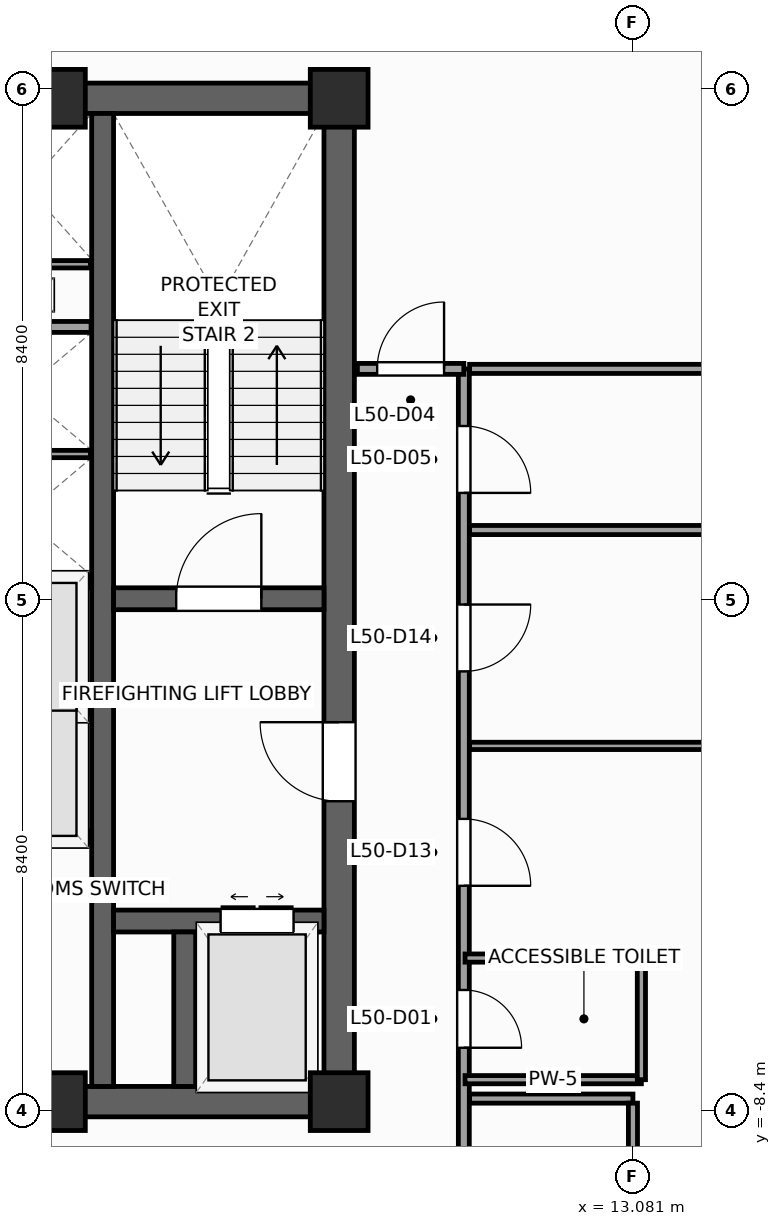
"""IFC4 building model, lengths in metres.
Left out: names, types, materials, properties, quantities, classifications, styles, units other than length and angle.
Written with IfcOpenShell. Run it as: python <this file> out.ifc"""

import sys

from ifc_helpers import new_model, si_unit, direction, frame, frame_2d, origin, origin_2d, place, context, subcontext, project, spatial, rectangle, extrude, source, transform, mapped, element, fill, save


model = new_model("IFC4")
c1 = context("Model", 3, precision=1e-05, world=origin(), true_north=direction((0.0, 1.0)))
c2 = subcontext(c1, "Body", "Model", "MODEL_VIEW")
j1 = project(units=[si_unit("LENGTHUNIT", "METRE"), si_unit("PLANEANGLEUNIT", "RADIAN")], contexts=[c1])
p1 = place(None, origin())
s1 = spatial("IfcSite", under=j1, at=p1, CompositionType="ELEMENT")
p2 = place(p1, origin())
s2 = spatial("IfcBuilding", under=s1, at=p2, CompositionType="ELEMENT")
p3 = place(p2, frame((0.0, 0.0, 209.5)))
s3 = spatial("IfcBuildingStorey", under=s2, at=p3, CompositionType="ELEMENT", Elevation=209.5)
p4 = place(p3, frame((-8.5, -8.25, 0.0), z_axis=(0.0, 0.0, 1.0), x_axis=(1.0, 0.0, 0.0)))
e1 = element("IfcWall", 1, at=p4, inside=s3, PredefinedType="SHEAR", context=c2, shape_type="SweptSolid", body=[
    extrude(rectangle(XDim=17.0, YDim=0.5, at=frame_2d((8.5, 0.0))), origin(), (0.0, 0.0, 1.0), 3.9),
])
p5 = place(p4, frame((7.85, 0.0, 0.0)))
e2 = element("IfcOpeningElement", 2, at=p5, cuts=e1, PredefinedType="OPENING", context=c2, shape_type="SweptSolid", body=[
    extrude(rectangle(XDim=1.3, YDim=2.2, at=frame_2d((0.65, 1.1))), frame((0.0, 0.26, 0.0), z_axis=(0.0, -1.0, 0.0), x_axis=(1.0, 0.0, 0.0)), (0.0, 0.0, 1.0), 0.52),
])
p6 = place(p3, frame((-8.5, 8.25, 0.0), z_axis=(0.0, 0.0, 1.0), x_axis=(1.0, 0.0, 0.0)))
e3 = element("IfcWall", 3, at=p6, inside=s3, PredefinedType="SHEAR", context=c2, shape_type="SweptSolid", body=[
    extrude(rectangle(XDim=17.0, YDim=0.5, at=frame_2d((8.5, 0.0))), origin(), (0.0, 0.0, 1.0), 3.9),
])
p7 = place(p3, frame((8.25, -8.0, 0.0), z_axis=(0.0, 0.0, 1.0), x_axis=(0.0, 1.0, 0.0)))
e4 = element("IfcWall", 4, at=p7, inside=s3, PredefinedType="SHEAR", context=c2, shape_type="SweptSolid", body=[
    extrude(rectangle(XDim=16.0, YDim=0.5, at=frame_2d((8.0, 0.0))), origin(), (0.0, 0.0, 1.0), 3.9),
])
p8 = place(p7, frame((4.69, 0.0, 0.0)))
e5 = element("IfcOpeningElement", 5, at=p8, cuts=e4, PredefinedType="OPENING", context=c2, shape_type="SweptSolid", body=[
    extrude(rectangle(XDim=1.3, YDim=2.2, at=frame_2d((0.65, 1.1))), frame((0.0, 0.26, 0.0), z_axis=(0.0, -1.0, 0.0), x_axis=(1.0, 0.0, 0.0)), (0.0, 0.0, 1.0), 0.52),
])
p9 = place(p3, frame((4.36, -8.0, 0.0), z_axis=(0.0, 0.0, 1.0), x_axis=(0.0, 1.0, 0.0)))
e6 = element("IfcWall", 6, at=p9, inside=s3, PredefinedType="SHEAR", context=c2, shape_type="SweptSolid", body=[
    extrude(rectangle(XDim=16.0, YDim=0.36, at=frame_2d((8.0, 0.0))), origin(), (0.0, 0.0, 1.0), 3.9),
])
p10 = place(p3, frame((4.54, 0.02, 0.0), z_axis=(0.0, 0.0, 1.0), x_axis=(1.0, 0.0, 0.0)))
e7 = element("IfcWall", 7, at=p10, inside=s3, PredefinedType="SHEAR", context=c2, shape_type="SweptSolid", body=[
    extrude(rectangle(XDim=3.46, YDim=0.36, at=frame_2d((1.73, 0.0))), origin(), (0.0, 0.0, 1.0), 3.9),
])
p11 = place(p10, frame((1.03, 0.0, 0.0)))
e8 = element("IfcOpeningElement", 8, at=p11, cuts=e7, PredefinedType="OPENING", context=c2, shape_type="SweptSolid", body=[
    extrude(rectangle(XDim=1.4, YDim=2.2, at=frame_2d((0.7, 1.1))), frame((0.0, 0.19, 0.0), z_axis=(0.0, -1.0, 0.0), x_axis=(1.0, 0.0, 0.0)), (0.0, 0.0, 1.0), 0.38),
])
p12 = place(p3, frame((4.54, -5.28, 0.0), z_axis=(0.0, 0.0, 1.0), x_axis=(1.0, 0.0, 0.0)))
e9 = element("IfcWall", 9, at=p12, inside=s3, PredefinedType="SHEAR", context=c2, shape_type="SweptSolid", body=[
    extrude(rectangle(XDim=3.46, YDim=0.36, at=frame_2d((1.73, 0.0))), origin(), (0.0, 0.0, 1.0), 3.9),
])
p13 = place(p12, frame((1.76, 0.0, 0.0)))
e10 = element("IfcOpeningElement", 10, at=p13, cuts=e9, PredefinedType="OPENING", context=c2, shape_type="SweptSolid", body=[
    extrude(rectangle(XDim=1.2, YDim=2.25, at=frame_2d((0.6, 1.125))), frame((0.0, 0.19, 0.0), z_axis=(0.0, -1.0, 0.0), x_axis=(1.0, 0.0, 0.0)), (0.0, 0.0, 1.0), 0.38),
])
p14 = place(p3, frame((5.71, -8.0, 0.0), z_axis=(0.0, 0.0, 1.0), x_axis=(0.0, 1.0, 0.0)))
e11 = element("IfcWall", 11, at=p14, inside=s3, PredefinedType="SHEAR", context=c2, shape_type="SweptSolid", body=[
    extrude(rectangle(XDim=2.54, YDim=0.36, at=frame_2d((1.27, 0.0))), origin(), (0.0, 0.0, 1.0), 3.9),
])
m1 = source(origin(), c2, "Body", "SweptSolid", [
    extrude(rectangle(XDim=0.95, YDim=0.95, at=origin_2d()), origin(), (0.0, 0.0, 1.0), 3.9),
])
for number, where, z_axis, x_axis in (
    (12, (8.25, -8.25, 0.0), (0.0, 0.0, 1.0), (1.0, 0.0, 0.0)),
    (13, (8.25, 8.25, 0.0), (0.0, 0.0, 1.0), (1.0, 0.0, 0.0)),
    (14, (3.6, -8.25, 0.0), (0.0, 0.0, 1.0), (1.0, 0.0, 0.0)),
    (15, (3.6, 8.25, 0.0), (0.0, 0.0, 1.0), (1.0, 0.0, 0.0)),
):
    element("IfcColumn", number, at=place(p3, frame(where, z_axis=z_axis, x_axis=x_axis)), inside=s3, PredefinedType="PILASTER", context=c2, shape_type="MappedRepresentation", body=[
        mapped(m1, transform((0.0, 0.0, 0.0), scale=1.0)),
    ])
p15 = place(p3, frame((6.733, -29.154, 0.0), z_axis=(0.0, 0.0, 1.0), x_axis=(0.629325378072, 0.77714192302, 0.0)))
e16 = element("IfcWall", 16, at=p15, inside=s3, PredefinedType="STANDARD", context=c2, shape_type="SweptSolid", body=[
    extrude(rectangle(XDim=36.84, YDim=0.34, at=frame_2d((18.42, 0.0))), origin(), (0.0, 0.0, 1.0), 2.96),
])
p16 = place(p15, frame((23.495, 0.0, 0.0)))
e17 = element("IfcOpeningElement", 17, at=p16, cuts=e16, PredefinedType="OPENING", context=c2, shape_type="SweptSolid", body=[
    extrude(rectangle(XDim=1.05, YDim=2.25, at=frame_2d((0.525, 1.125))), frame((0.0, 0.18, 0.0), z_axis=(0.0, -1.0, 0.0), x_axis=(1.0, 0.0, 0.0)), (0.0, 0.0, 1.0), 0.36),
])
p17 = place(p15, frame((3.721, 0.0, 0.48)))
e18 = element("IfcOpeningElement", 18, at=p17, cuts=e16, PredefinedType="OPENING", context=c2, shape_type="SweptSolid", body=[
    extrude(rectangle(XDim=1.4, YDim=2.4, at=frame_2d((0.7, 1.2))), frame((0.0, 0.18, 0.0), z_axis=(0.0, -1.0, 0.0), x_axis=(1.0, 0.0, 0.0)), (0.0, 0.0, 1.0), 0.36),
])
p18 = place(p15, frame((10.559, 0.0, 0.58)))
e19 = element("IfcOpeningElement", 19, at=p18, cuts=e16, PredefinedType="OPENING", context=c2, shape_type="SweptSolid", body=[
    extrude(rectangle(XDim=1.75, YDim=2.3, at=frame_2d((0.875, 1.15))), frame((0.0, 0.18, 0.0), z_axis=(0.0, -1.0, 0.0), x_axis=(1.0, 0.0, 0.0)), (0.0, 0.0, 1.0), 0.36),
])
p19 = place(p15, frame((16.058, 0.0, 0.58)))
e20 = element("IfcOpeningElement", 20, at=p19, cuts=e16, PredefinedType="OPENING", context=c2, shape_type="SweptSolid", body=[
    extrude(rectangle(XDim=1.75, YDim=2.3, at=frame_2d((0.875, 1.15))), frame((0.0, 0.18, 0.0), z_axis=(0.0, -1.0, 0.0), x_axis=(1.0, 0.0, 0.0)), (0.0, 0.0, 1.0), 0.36),
])
p20 = place(p15, frame((25.676, 0.0, 0.58)))
e21 = element("IfcOpeningElement", 21, at=p20, cuts=e16, PredefinedType="OPENING", context=c2, shape_type="SweptSolid", body=[
    extrude(rectangle(XDim=1.75, YDim=2.3, at=frame_2d((0.875, 1.15))), frame((0.0, 0.18, 0.0), z_axis=(0.0, -1.0, 0.0), x_axis=(1.0, 0.0, 0.0)), (0.0, 0.0, 1.0), 0.36),
])
p21 = place(p15, frame((30.982, 0.0, 0.48)))
e22 = element("IfcOpeningElement", 22, at=p21, cuts=e16, PredefinedType="OPENING", context=c2, shape_type="SweptSolid", body=[
    extrude(rectangle(XDim=1.4, YDim=2.4, at=frame_2d((0.7, 1.2))), frame((0.0, 0.18, 0.0), z_axis=(0.0, -1.0, 0.0), x_axis=(1.0, 0.0, 0.0)), (0.0, 0.0, 1.0), 0.36),
])
p22 = place(p3, frame((29.154, 6.733, 0.0), z_axis=(0.0, 0.0, 1.0), x_axis=(-0.77714192302, 0.629325378072, 0.0)))
e23 = element("IfcWall", 23, at=p22, inside=s3, PredefinedType="STANDARD", context=c2, shape_type="SweptSolid", body=[
    extrude(rectangle(XDim=36.84, YDim=0.34, at=frame_2d((18.42, 0.0))), origin(), (0.0, 0.0, 1.0), 2.96),
])
p23 = place(p22, frame((3.721, 0.0, 0.48)))
e24 = element("IfcOpeningElement", 24, at=p23, cuts=e23, PredefinedType="OPENING", context=c2, shape_type="SweptSolid", body=[
    extrude(rectangle(XDim=1.4, YDim=2.4, at=frame_2d((0.7, 1.2))), frame((0.0, 0.18, 0.0), z_axis=(0.0, -1.0, 0.0), x_axis=(1.0, 0.0, 0.0)), (0.0, 0.0, 1.0), 0.36),
])
p24 = place(p22, frame((9.809, 0.0, 0.58)))
e25 = element("IfcOpeningElement", 25, at=p24, cuts=e23, PredefinedType="OPENING", context=c2, shape_type="SweptSolid", body=[
    extrude(rectangle(XDim=1.75, YDim=2.3, at=frame_2d((0.875, 1.15))), frame((0.0, 0.18, 0.0), z_axis=(0.0, -1.0, 0.0), x_axis=(1.0, 0.0, 0.0)), (0.0, 0.0, 1.0), 0.36),
])
p25 = place(p22, frame((16.058, 0.0, 0.58)))
e26 = element("IfcOpeningElement", 26, at=p25, cuts=e23, PredefinedType="OPENING", context=c2, shape_type="SweptSolid", body=[
    extrude(rectangle(XDim=1.75, YDim=2.3, at=frame_2d((0.875, 1.15))), frame((0.0, 0.18, 0.0), z_axis=(0.0, -1.0, 0.0), x_axis=(1.0, 0.0, 0.0)), (0.0, 0.0, 1.0), 0.36),
])
p26 = place(p22, frame((24.176, 0.0, 0.58)))
e27 = element("IfcOpeningElement", 27, at=p26, cuts=e23, PredefinedType="OPENING", context=c2, shape_type="SweptSolid", body=[
    extrude(rectangle(XDim=1.75, YDim=2.3, at=frame_2d((0.875, 1.15))), frame((0.0, 0.18, 0.0), z_axis=(0.0, -1.0, 0.0), x_axis=(1.0, 0.0, 0.0)), (0.0, 0.0, 1.0), 0.36),
])
p27 = place(p22, frame((30.982, 0.0, 0.48)))
e28 = element("IfcOpeningElement", 28, at=p27, cuts=e23, PredefinedType="OPENING", context=c2, shape_type="SweptSolid", body=[
    extrude(rectangle(XDim=1.4, YDim=2.4, at=frame_2d((0.7, 1.2))), frame((0.0, 0.18, 0.0), z_axis=(0.0, -1.0, 0.0), x_axis=(1.0, 0.0, 0.0)), (0.0, 0.0, 1.0), 0.36),
])
for number, where, z_axis, x_axis in (
    (29, (1.89, -3.9, 0.0), (0.0, 0.0, 1.0), (1.0, 0.0, 0.0)),
    (30, (1.89, 0.3, 0.0), (0.0, 0.0, 1.0), (1.0, 0.0, 0.0)),
    (31, (1.89, 4.49, 0.0), (0.0, 0.0, 1.0), (1.0, 0.0, 0.0)),
):
    element("IfcWall", number, at=place(p3, frame(where, z_axis=z_axis, x_axis=x_axis)), inside=s3, PredefinedType="PARTITIONING", context=c2, shape_type="SweptSolid", body=[
        extrude(rectangle(XDim=2.28, YDim=0.18, at=frame_2d((1.14, 0.0))), origin(), (0.0, 0.0, 1.0), 3.66),
    ])
for number, where, z_axis, x_axis in (
    (32, (1.9, -1.8, 0.0), (0.0, 0.0, 1.0), (1.0, 0.0, 0.0)),
    (33, (1.9, 2.4, 0.0), (0.0, 0.0, 1.0), (1.0, 0.0, 0.0)),
):
    element("IfcWall", number, at=place(p3, frame(where, z_axis=z_axis, x_axis=x_axis)), inside=s3, PredefinedType="PARTITIONING", context=c2, shape_type="SweptSolid", body=[
        extrude(rectangle(XDim=2.26, YDim=0.12, at=frame_2d((1.13, 0.0))), origin(), (0.0, 0.0, 1.0), 3.66),
    ])
p28 = place(p3, frame((2.06, 5.52, 0.0), z_axis=(0.0, 0.0, 1.0), x_axis=(1.0, 0.0, 0.0)))
e34 = element("IfcWall", 34, at=p28, inside=s3, PredefinedType="PARTITIONING", context=c2, shape_type="SweptSolid", body=[
    extrude(rectangle(XDim=2.1, YDim=0.12, at=frame_2d((1.05, 0.0))), origin(), (0.0, 0.0, 1.0), 3.66),
])
p29 = place(p3, frame((10.3, -12.35, 0.0), z_axis=(0.0, 0.0, 1.0), x_axis=(0.0, 1.0, 0.0)))
e35 = element("IfcWall", 35, at=p29, inside=s3, PredefinedType="PARTITIONING", context=c2, shape_type="SweptSolid", body=[
    extrude(rectangle(XDim=16.15, YDim=0.18, at=frame_2d((8.075, 0.0))), origin(), (0.0, 0.0, 1.0), 3.66),
])
p30 = place(p29, frame((4.986, 0.0, 0.0)))
e36 = element("IfcOpeningElement", 36, at=p30, cuts=e35, PredefinedType="OPENING", context=c2, shape_type="SweptSolid", body=[
    extrude(rectangle(XDim=0.95, YDim=2.1, at=frame_2d((0.475, 1.05))), frame((0.0, 0.1, 0.0), z_axis=(0.0, -1.0, 0.0), x_axis=(1.0, 0.0, 0.0)), (0.0, 0.0, 1.0), 0.2),
])
p31 = place(p29, frame((14.111, 0.0, 0.0)))
e37 = element("IfcOpeningElement", 37, at=p31, cuts=e35, PredefinedType="OPENING", context=c2, shape_type="SweptSolid", body=[
    extrude(rectangle(XDim=1.1, YDim=2.2, at=frame_2d((0.55, 1.1))), frame((0.0, 0.1, 0.0), z_axis=(0.0, -1.0, 0.0), x_axis=(1.0, 0.0, 0.0)), (0.0, 0.0, 1.0), 0.2),
])
p32 = place(p29, frame((1.689, 0.0, 0.0)))
e38 = element("IfcOpeningElement", 38, at=p32, cuts=e35, PredefinedType="OPENING", context=c2, shape_type="SweptSolid", body=[
    extrude(rectangle(XDim=1.1, YDim=2.2, at=frame_2d((0.55, 1.1))), frame((0.0, 0.1, 0.0), z_axis=(0.0, -1.0, 0.0), x_axis=(1.0, 0.0, 0.0)), (0.0, 0.0, 1.0), 0.2),
])
p33 = place(p29, frame((7.65, 0.0, 0.0)))
e39 = element("IfcOpeningElement", 39, at=p33, cuts=e35, PredefinedType="OPENING", context=c2, shape_type="SweptSolid", body=[
    extrude(rectangle(XDim=1.1, YDim=2.2, at=frame_2d((0.55, 1.1))), frame((0.0, 0.1, 0.0), z_axis=(0.0, -1.0, 0.0), x_axis=(1.0, 0.0, 0.0)), (0.0, 0.0, 1.0), 0.2),
])
p34 = place(p29, frame((11.175, 0.0, 0.0)))
e40 = element("IfcOpeningElement", 40, at=p34, cuts=e35, PredefinedType="OPENING", context=c2, shape_type="SweptSolid", body=[
    extrude(rectangle(XDim=1.1, YDim=2.2, at=frame_2d((0.55, 1.1))), frame((0.0, 0.1, 0.0), z_axis=(0.0, -1.0, 0.0), x_axis=(1.0, 0.0, 0.0)), (0.0, 0.0, 1.0), 0.2),
])
p35 = place(p3, frame((8.55, 3.8, 0.0), z_axis=(0.0, 0.0, 1.0), x_axis=(1.0, 0.0, 0.0)))
e41 = element("IfcWall", 41, at=p35, inside=s3, PredefinedType="PARTITIONING", context=c2, shape_type="SweptSolid", body=[
    extrude(rectangle(XDim=1.75, YDim=0.18, at=frame_2d((0.875, 0.0))), origin(), (0.0, 0.0, 1.0), 3.66),
])
p36 = place(p35, frame((0.325, 0.0, 0.0)))
e42 = element("IfcOpeningElement", 42, at=p36, cuts=e41, PredefinedType="OPENING", context=c2, shape_type="SweptSolid", body=[
    extrude(rectangle(XDim=1.1, YDim=2.2, at=frame_2d((0.55, 1.1))), frame((0.0, 0.1, 0.0), z_axis=(0.0, -1.0, 0.0), x_axis=(1.0, 0.0, 0.0)), (0.0, 0.0, 1.0), 0.2),
])
p37 = place(p3, frame((10.395, 1.15, 0.0), z_axis=(0.0, 0.0, 1.0), x_axis=(1.0, 0.0, 0.0)))
e43 = element("IfcWall", 43, at=p37, inside=s3, PredefinedType="PARTITIONING", context=c2, shape_type="SweptSolid", body=[
    extrude(rectangle(XDim=16.747, YDim=0.15, at=frame_2d((8.374, 0.0))), origin(), (0.0, 0.0, 1.0), 3.66),
])
p38 = place(p3, frame((10.395, 3.8, 0.0), z_axis=(0.0, 0.0, 1.0), x_axis=(1.0, 0.0, 0.0)))
e44 = element("IfcWall", 44, at=p38, inside=s3, PredefinedType="PARTITIONING", context=c2, shape_type="SweptSolid", body=[
    extrude(rectangle(XDim=15.812, YDim=0.15, at=frame_2d((7.906, 0.0))), origin(), (0.0, 0.0, 1.0), 3.66),
])
p39 = place(p3, frame((10.395, -8.2, 0.0), z_axis=(0.0, 0.0, 1.0), x_axis=(1.0, 0.0, 0.0)))
e45 = element("IfcWall", 45, at=p39, inside=s3, PredefinedType="PARTITIONING", context=c2, shape_type="SweptSolid", body=[
    extrude(rectangle(XDim=2.686, YDim=0.15, at=frame_2d((1.343, 0.0))), origin(), (0.0, 0.0, 1.0), 3.66),
])
p40 = place(p3, frame((13.081, -8.275, 0.0), z_axis=(0.0, 0.0, 1.0), x_axis=(0.0, -1.0, 0.0)))
e46 = element("IfcWall", 46, at=p40, inside=s3, PredefinedType="PARTITIONING", context=c2, shape_type="SweptSolid", body=[
    extrude(rectangle(XDim=12.874, YDim=0.15, at=frame_2d((6.437, 0.0))), origin(), (0.0, 0.0, 1.0), 2.76),
])
p41 = place(p3, frame((10.395, -2.4, 0.0), z_axis=(0.0, 0.0, 1.0), x_axis=(1.0, 0.0, 0.0)))
e47 = element("IfcWall", 47, at=p41, inside=s3, PredefinedType="PARTITIONING", context=c2, shape_type="SweptSolid", body=[
    extrude(rectangle(XDim=17.868, YDim=0.12, at=frame_2d((8.934, 0.0))), origin(), (0.0, 0.0, 1.0), 3.66),
])
p42 = place(p3, frame((10.32, -7.889, 0.0), z_axis=(0.0, 0.0, 1.0), x_axis=(1.0, 0.0, 0.0)))
e48 = element("IfcWall", 48, at=p42, inside=s3, PredefinedType="PARTITIONING", context=c2, shape_type="SweptSolid", body=[
    extrude(rectangle(XDim=2.9, YDim=0.135, at=frame_2d((1.45, 0.0))), origin(), (0.0, 0.0, 1.0), 3.66),
])
p43 = place(p3, frame((13.22, -7.889, 0.0), z_axis=(0.0, 0.0, 1.0), x_axis=(0.0, 1.0, 0.0)))
e49 = element("IfcWall", 49, at=p43, inside=s3, PredefinedType="PARTITIONING", context=c2, shape_type="SweptSolid", body=[
    extrude(rectangle(XDim=2.0, YDim=0.135, at=frame_2d((1.0, 0.0))), origin(), (0.0, 0.0, 1.0), 2.76),
])
p44 = place(p3, frame((10.32, -5.889, 0.0), z_axis=(0.0, 0.0, 1.0), x_axis=(1.0, 0.0, 0.0)))
e50 = element("IfcWall", 50, at=p44, inside=s3, PredefinedType="PARTITIONING", context=c2, shape_type="SweptSolid", body=[
    extrude(rectangle(XDim=2.9, YDim=0.135, at=frame_2d((1.45, 0.0))), origin(), (0.0, 0.0, 1.0), 3.66),
])
m2 = source(origin(), c2, "Body", "SweptSolid", [
    extrude(rectangle(XDim=1.4, YDim=2.2, at=frame_2d((0.7, 1.1))), frame((0.0, 0.025, 0.0), z_axis=(0.0, -1.0, 0.0), x_axis=(1.0, 0.0, 0.0)), (0.0, 0.0, 1.0), 0.05),
])
p45 = place(p11, origin())
e51 = element("IfcDoor", 51, at=p45, inside=s3, OperationType="SINGLE_SWING_RIGHT", PredefinedType="DOOR", context=c2, shape_type="MappedRepresentation", body=[
    mapped(m2, transform((0.0, 0.0, 0.0), scale=1.0)),
])
fill(e8, e51)
m3 = source(origin(), c2, "Body", "SweptSolid", [
    extrude(rectangle(XDim=1.3, YDim=2.2, at=frame_2d((0.65, 1.1))), frame((0.0, 0.025, 0.0), z_axis=(0.0, -1.0, 0.0), x_axis=(1.0, 0.0, 0.0)), (0.0, 0.0, 1.0), 0.05),
])
p46 = place(p8, origin())
e52 = element("IfcDoor", 52, at=p46, inside=s3, OperationType="SINGLE_SWING_RIGHT", PredefinedType="DOOR", context=c2, shape_type="MappedRepresentation", body=[
    mapped(m3, transform((0.0, 0.0, 0.0), scale=1.0)),
])
fill(e5, e52)
m4 = source(origin(), c2, "Body", "SweptSolid", [
    extrude(rectangle(XDim=1.2, YDim=2.25, at=frame_2d((0.6, 1.125))), frame((0.0, 0.025, 0.0), z_axis=(0.0, -1.0, 0.0), x_axis=(1.0, 0.0, 0.0)), (0.0, 0.0, 1.0), 0.05),
])
p47 = place(p13, origin())
e53 = element("IfcDoor", 53, at=p47, inside=s3, OperationType="DOUBLE_DOOR_SLIDING", PredefinedType="DOOR", context=c2, shape_type="MappedRepresentation", body=[
    mapped(m4, transform((0.0, 0.0, 0.0), scale=1.0)),
])
fill(e10, e53)
m5 = source(origin(), c2, "Body", "SweptSolid", [
    extrude(rectangle(XDim=0.95, YDim=2.1, at=frame_2d((0.475, 1.05))), frame((0.0, 0.025, 0.0), z_axis=(0.0, -1.0, 0.0), x_axis=(1.0, 0.0, 0.0)), (0.0, 0.0, 1.0), 0.05),
])
p48 = place(p30, frame((0.95, 0.0, 0.0), z_axis=(0.0, 0.0, 1.0), x_axis=(-1.0, 0.0, 0.0)))
e54 = element("IfcDoor", 54, at=p48, inside=s3, OperationType="SINGLE_SWING_LEFT", PredefinedType="DOOR", context=c2, shape_type="MappedRepresentation", body=[
    mapped(m5, transform((0.0, 0.0, 0.0), scale=1.0)),
])
fill(e36, e54)
m6 = source(origin(), c2, "Body", "SweptSolid", [
    extrude(rectangle(XDim=1.1, YDim=2.2, at=frame_2d((0.55, 1.1))), frame((0.0, 0.025, 0.0), z_axis=(0.0, -1.0, 0.0), x_axis=(1.0, 0.0, 0.0)), (0.0, 0.0, 1.0), 0.05),
])
p49 = place(p36, origin())
e55 = element("IfcDoor", 55, at=p49, inside=s3, OperationType="SINGLE_SWING_RIGHT", PredefinedType="DOOR", context=c2, shape_type="MappedRepresentation", body=[
    mapped(m6, transform((0.0, 0.0, 0.0), scale=1.0)),
])
fill(e42, e55)
p50 = place(p31, frame((1.1, 0.0, 0.0), z_axis=(0.0, 0.0, 1.0), x_axis=(-1.0, 0.0, 0.0)))
e56 = element("IfcDoor", 56, at=p50, inside=s3, OperationType="SINGLE_SWING_LEFT", PredefinedType="DOOR", context=c2, shape_type="MappedRepresentation", body=[
    mapped(m6, transform((0.0, 0.0, 0.0), scale=1.0)),
])
fill(e37, e56)
p51 = place(p33, frame((1.1, 0.0, 0.0), z_axis=(0.0, 0.0, 1.0), x_axis=(-1.0, 0.0, 0.0)))
e57 = element("IfcDoor", 57, at=p51, inside=s3, OperationType="SINGLE_SWING_LEFT", PredefinedType="DOOR", context=c2, shape_type="MappedRepresentation", body=[
    mapped(m6, transform((0.0, 0.0, 0.0), scale=1.0)),
])
fill(e39, e57)
p52 = place(p34, frame((1.1, 0.0, 0.0), z_axis=(0.0, 0.0, 1.0), x_axis=(-1.0, 0.0, 0.0)))
e58 = element("IfcDoor", 58, at=p52, inside=s3, OperationType="SINGLE_SWING_RIGHT", PredefinedType="DOOR", context=c2, shape_type="MappedRepresentation", body=[
    mapped(m6, transform((0.0, 0.0, 0.0), scale=1.0)),
])
fill(e40, e58)
save(model, sys.argv[1])
